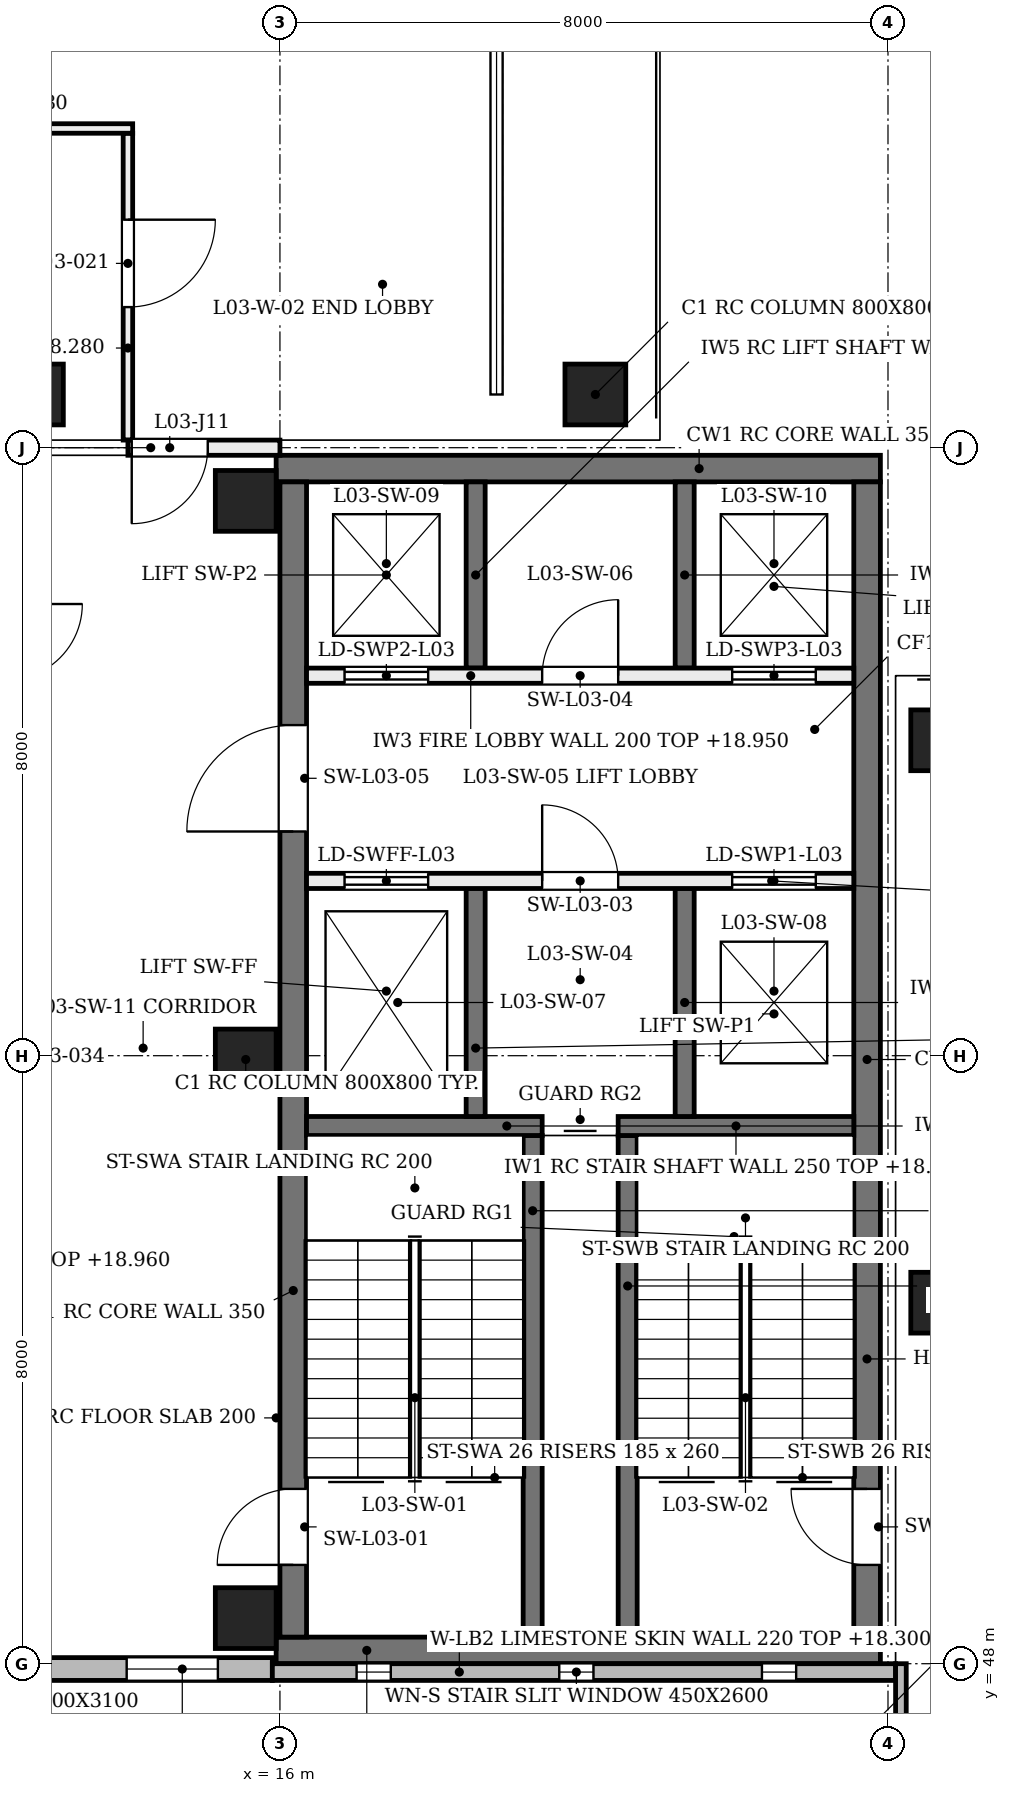
"""IFC4 building model, lengths in metres.
Left out: names, types, materials, properties, quantities, classifications, styles, units other than length and angle.
Written with IfcOpenShell. Run it as: python <this file> out.ifc"""

import sys

from ifc_helpers import new_model, si_unit, direction, frame, frame_2d, origin, origin_2d, place, context, subcontext, project, spatial, rectangle, extrude, element, fill, save


model = new_model("IFC4")
c1 = context("Model", 3, precision=1e-05, world=origin(), true_north=direction((0.0, 1.0)))
c2 = subcontext(c1, "Body", "Model", "MODEL_VIEW")
j1 = project(units=[si_unit("LENGTHUNIT", "METRE"), si_unit("PLANEANGLEUNIT", "RADIAN")], contexts=[c1])
p1 = place(None, origin())
s1 = spatial("IfcSite", under=j1, at=p1, CompositionType="ELEMENT")
p2 = place(p1, origin())
s2 = spatial("IfcBuilding", under=s1, at=p2, CompositionType="ELEMENT")
p3 = place(p2, frame((0.0, 0.0, 14.4)))
s3 = spatial("IfcBuildingStorey", under=s2, at=p3, CompositionType="ELEMENT", Elevation=14.4)
for number, where, z_axis, x_axis in (
    (1, (15.95, 48.175, 0.0), (0.0, 0.0, 1.0), (1.0, 0.0, 0.0)),
    (2, (15.95, 63.725, 0.0), (0.0, 0.0, 1.0), (1.0, 0.0, 0.0)),
):
    element("IfcWall", number, at=place(p3, frame(where, z_axis=z_axis, x_axis=x_axis)), inside=s3, PredefinedType="SHEAR", context=c2, shape_type="SweptSolid", body=[
        extrude(rectangle(XDim=7.95, YDim=0.35, at=frame_2d((3.975, 0.0))), origin(), (0.0, 0.0, 1.0), 4.58),
    ])
p4 = place(p3, frame((16.175, 48.35, 0.0), z_axis=(0.0, 0.0, 1.0), x_axis=(0.0, 1.0, 0.0)))
e3 = element("IfcWall", 3, at=p4, inside=s3, PredefinedType="SHEAR", context=c2, shape_type="SweptSolid", body=[
    extrude(rectangle(XDim=15.2, YDim=0.35, at=frame_2d((7.6, 0.0))), origin(), (0.0, 0.0, 1.0), 4.58),
])
p5 = place(p4, frame((0.95, 0.0, 0.0)))
e4 = element("IfcOpeningElement", 4, at=p5, cuts=e3, PredefinedType="OPENING", context=c2, shape_type="SweptSolid", body=[
    extrude(rectangle(XDim=1.0, YDim=2.1, at=frame_2d((0.5, 1.05))), frame((0.0, 0.185, 0.0), z_axis=(0.0, -1.0, 0.0), x_axis=(1.0, 0.0, 0.0)), (0.0, 0.0, 1.0), 0.37),
])
p6 = place(p4, frame((10.6, 0.0, 0.0)))
e5 = element("IfcOpeningElement", 5, at=p6, cuts=e3, PredefinedType="OPENING", context=c2, shape_type="SweptSolid", body=[
    extrude(rectangle(XDim=1.4, YDim=2.1, at=frame_2d((0.7, 1.05))), frame((0.0, 0.185, 0.0), z_axis=(0.0, -1.0, 0.0), x_axis=(1.0, 0.0, 0.0)), (0.0, 0.0, 1.0), 0.37),
])
p7 = place(p3, frame((23.725, 48.35, 0.0), z_axis=(0.0, 0.0, 1.0), x_axis=(0.0, 1.0, 0.0)))
e6 = element("IfcWall", 6, at=p7, inside=s3, PredefinedType="SHEAR", context=c2, shape_type="SweptSolid", body=[
    extrude(rectangle(XDim=15.2, YDim=0.35, at=frame_2d((7.6, 0.0))), origin(), (0.0, 0.0, 1.0), 4.58),
])
p8 = place(p7, frame((0.95, 0.0, 0.0)))
e7 = element("IfcOpeningElement", 7, at=p8, cuts=e6, PredefinedType="OPENING", context=c2, shape_type="SweptSolid", body=[
    extrude(rectangle(XDim=1.0, YDim=2.1, at=frame_2d((0.5, 1.05))), frame((0.0, 0.185, 0.0), z_axis=(0.0, -1.0, 0.0), x_axis=(1.0, 0.0, 0.0)), (0.0, 0.0, 1.0), 0.37),
])
for number, where, z_axis, x_axis in (
    (8, (15.55, 48.6, 0.0), (0.0, 0.0, 1.0), (1.0, 0.0, 0.0)),
    (9, (15.55, 55.95, 0.0), (0.0, 0.0, 1.0), (1.0, 0.0, 0.0)),
    (10, (15.55, 63.3, 0.0), (0.0, 0.0, 1.0), (1.0, 0.0, 0.0)),
):
    element("IfcColumn", number, at=place(p3, frame(where, z_axis=z_axis, x_axis=x_axis)), inside=s3, PredefinedType="COLUMN", context=c2, shape_type="SweptSolid", body=[
        extrude(rectangle(XDim=0.8, YDim=0.8, at=origin_2d()), origin(), (0.0, 0.0, 1.0), 4.8),
    ])
for number, where, z_axis, x_axis in (
    (11, (24.7, 53.0, 0.0), (0.0, -0.204, 0.979), (1.0, 0.0, 0.0)),
    (12, (24.7, 60.4, 0.0), (0.0, -0.204, 0.979), (1.0, 0.0, 0.0)),
    (13, (13.0, 64.7, 0.0), (-0.204, 0.0, 0.979), (0.0, -1.0, 0.0)),
    (14, (20.4, 64.7, 0.0), (-0.204, 0.0, 0.979), (0.0, -1.0, 0.0)),
):
    element("IfcColumn", number, at=place(p3, frame(where, z_axis=z_axis, x_axis=x_axis)), inside=s3, PredefinedType="COLUMN", context=c2, shape_type="SweptSolid", body=[
        extrude(rectangle(XDim=0.8, YDim=0.8, at=origin_2d()), origin(), (0.0, 0.0, 1.0), 4.903),
    ])
p9 = place(p3, frame((18.85, 64.9, 4.1), z_axis=(0.0, 0.0, 1.0), x_axis=(0.0, 1.0, 0.0)))
e15 = element("IfcWall", 15, at=p9, inside=s3, PredefinedType="SOLIDWALL", context=c2, shape_type="SweptSolid", body=[
    extrude(rectangle(XDim=6.9, YDim=0.15, at=frame_2d((3.45, 0.0))), origin(), (0.0, 0.0, 1.0), 0.48),
])
p10 = place(p3, frame((8.0, 47.93, 0.0), z_axis=(0.0, 0.0, 1.0), x_axis=(1.0, 0.0, 0.0)))
e16 = element("IfcWall", 16, at=p10, inside=s3, PredefinedType="SOLIDWALL", context=c2, shape_type="SweptSolid", body=[
    extrude(rectangle(XDim=7.9, YDim=0.3, at=frame_2d((3.95, 0.0))), origin(), (0.0, 0.0, 1.0), 3.9),
])
p11 = place(p10, frame((0.717, 0.0, 0.75)))
e17 = element("IfcOpeningElement", 17, at=p11, cuts=e16, PredefinedType="OPENING", context=c2, shape_type="SweptSolid", body=[
    extrude(rectangle(XDim=1.2, YDim=3.1, at=frame_2d((0.6, 1.55))), frame((0.0, 0.16, 0.0), z_axis=(0.0, -1.0, 0.0), x_axis=(1.0, 0.0, 0.0)), (0.0, 0.0, 1.0), 0.32),
])
p12 = place(p10, frame((3.35, 0.0, 0.75)))
e18 = element("IfcOpeningElement", 18, at=p12, cuts=e16, PredefinedType="OPENING", context=c2, shape_type="SweptSolid", body=[
    extrude(rectangle(XDim=1.2, YDim=3.1, at=frame_2d((0.6, 1.55))), frame((0.0, 0.16, 0.0), z_axis=(0.0, -1.0, 0.0), x_axis=(1.0, 0.0, 0.0)), (0.0, 0.0, 1.0), 0.32),
])
p13 = place(p10, frame((5.983, 0.0, 0.75)))
e19 = element("IfcOpeningElement", 19, at=p13, cuts=e16, PredefinedType="OPENING", context=c2, shape_type="SweptSolid", body=[
    extrude(rectangle(XDim=1.2, YDim=3.1, at=frame_2d((0.6, 1.55))), frame((0.0, 0.16, 0.0), z_axis=(0.0, -1.0, 0.0), x_axis=(1.0, 0.0, 0.0)), (0.0, 0.0, 1.0), 0.32),
])
p14 = place(p3, frame((15.9, 47.89, 0.0), z_axis=(0.0, 0.0, 1.0), x_axis=(1.0, 0.0, 0.0)))
e20 = element("IfcWall", 20, at=p14, inside=s3, PredefinedType="SOLIDWALL", context=c2, shape_type="SweptSolid", body=[
    extrude(rectangle(XDim=8.2, YDim=0.22, at=frame_2d((4.1, 0.0))), origin(), (0.0, 0.0, 1.0), 3.9),
])
p15 = place(p14, frame((1.108, 0.0, 0.9)))
e21 = element("IfcOpeningElement", 21, at=p15, cuts=e20, PredefinedType="OPENING", context=c2, shape_type="SweptSolid", body=[
    extrude(rectangle(XDim=0.45, YDim=2.6, at=frame_2d((0.225, 1.3))), frame((0.0, 0.12, 0.0), z_axis=(0.0, -1.0, 0.0), x_axis=(1.0, 0.0, 0.0)), (0.0, 0.0, 1.0), 0.24),
])
p16 = place(p14, frame((3.775, 0.0, 0.9)))
e22 = element("IfcOpeningElement", 22, at=p16, cuts=e20, PredefinedType="OPENING", context=c2, shape_type="SweptSolid", body=[
    extrude(rectangle(XDim=0.45, YDim=2.6, at=frame_2d((0.225, 1.3))), frame((0.0, 0.12, 0.0), z_axis=(0.0, -1.0, 0.0), x_axis=(1.0, 0.0, 0.0)), (0.0, 0.0, 1.0), 0.24),
])
p17 = place(p14, frame((6.442, 0.0, 0.9)))
e23 = element("IfcOpeningElement", 23, at=p17, cuts=e20, PredefinedType="OPENING", context=c2, shape_type="SweptSolid", body=[
    extrude(rectangle(XDim=0.45, YDim=2.6, at=frame_2d((0.225, 1.3))), frame((0.0, 0.12, 0.0), z_axis=(0.0, -1.0, 0.0), x_axis=(1.0, 0.0, 0.0)), (0.0, 0.0, 1.0), 0.24),
])
p18 = place(p3, frame((24.17, 45.0, 0.0), z_axis=(0.0, 0.0, 1.0), x_axis=(0.0, 1.0, 0.0)))
e24 = element("IfcWall", 24, at=p18, inside=s3, PredefinedType="SOLIDWALL", context=c2, shape_type="SweptSolid", body=[
    extrude(rectangle(XDim=3.0, YDim=0.14, at=frame_2d((1.5, 0.0))), origin(), (0.0, 0.0, 1.0), 3.9),
])
for number, where, z_axis, x_axis in (
    (25, (19.325, 48.35, 0.0), (0.0, 0.0, 1.0), (0.0, 1.0, 0.0)),
    (26, (20.575, 48.35, 0.0), (0.0, 0.0, 1.0), (0.0, 1.0, 0.0)),
):
    element("IfcWall", number, at=place(p3, frame(where, z_axis=z_axis, x_axis=x_axis)), inside=s3, PredefinedType="SOLIDWALL", context=c2, shape_type="SweptSolid", body=[
        extrude(rectangle(XDim=6.6, YDim=0.25, at=frame_2d((3.3, 0.0))), origin(), (0.0, 0.0, 1.0), 4.55),
    ])
p19 = place(p3, frame((16.35, 55.075, 0.0), z_axis=(0.0, 0.0, 1.0), x_axis=(1.0, 0.0, 0.0)))
e27 = element("IfcWall", 27, at=p19, inside=s3, PredefinedType="SOLIDWALL", context=c2, shape_type="SweptSolid", body=[
    extrude(rectangle(XDim=3.1, YDim=0.25, at=frame_2d((1.55, 0.0))), origin(), (0.0, 0.0, 1.0), 4.55),
])
p20 = place(p3, frame((20.45, 55.075, 0.0), z_axis=(0.0, 0.0, 1.0), x_axis=(1.0, 0.0, 0.0)))
e28 = element("IfcWall", 28, at=p20, inside=s3, PredefinedType="SOLIDWALL", context=c2, shape_type="SweptSolid", body=[
    extrude(rectangle(XDim=3.1, YDim=0.25, at=frame_2d((1.55, 0.0))), origin(), (0.0, 0.0, 1.0), 4.55),
])
p21 = place(p3, frame((18.575, 55.2, 0.0), z_axis=(0.0, 0.0, 1.0), x_axis=(0.0, 1.0, 0.0)))
e29 = element("IfcWall", 29, at=p21, inside=s3, PredefinedType="SOLIDWALL", context=c2, shape_type="SweptSolid", body=[
    extrude(rectangle(XDim=3.0, YDim=0.25, at=frame_2d((1.5, 0.0))), origin(), (0.0, 0.0, 1.0), 4.55),
])
p22 = place(p3, frame((18.575, 61.1, 0.0), z_axis=(0.0, 0.0, 1.0), x_axis=(0.0, 1.0, 0.0)))
e30 = element("IfcWall", 30, at=p22, inside=s3, PredefinedType="SOLIDWALL", context=c2, shape_type="SweptSolid", body=[
    extrude(rectangle(XDim=2.45, YDim=0.25, at=frame_2d((1.225, 0.0))), origin(), (0.0, 0.0, 1.0), 4.55),
])
p23 = place(p3, frame((21.325, 55.2, 0.0), z_axis=(0.0, 0.0, 1.0), x_axis=(0.0, 1.0, 0.0)))
e31 = element("IfcWall", 31, at=p23, inside=s3, PredefinedType="SOLIDWALL", context=c2, shape_type="SweptSolid", body=[
    extrude(rectangle(XDim=3.0, YDim=0.25, at=frame_2d((1.5, 0.0))), origin(), (0.0, 0.0, 1.0), 4.55),
])
p24 = place(p3, frame((21.325, 61.1, 0.0), z_axis=(0.0, 0.0, 1.0), x_axis=(0.0, 1.0, 0.0)))
e32 = element("IfcWall", 32, at=p24, inside=s3, PredefinedType="SOLIDWALL", context=c2, shape_type="SweptSolid", body=[
    extrude(rectangle(XDim=2.45, YDim=0.25, at=frame_2d((1.225, 0.0))), origin(), (0.0, 0.0, 1.0), 4.55),
])
p25 = place(p3, frame((16.35, 58.3, 0.0), z_axis=(0.0, 0.0, 1.0), x_axis=(1.0, 0.0, 0.0)))
e33 = element("IfcWall", 33, at=p25, inside=s3, PredefinedType="SOLIDWALL", context=c2, shape_type="SweptSolid", body=[
    extrude(rectangle(XDim=7.2, YDim=0.2, at=frame_2d((3.6, 0.0))), origin(), (0.0, 0.0, 1.0), 4.55),
])
p26 = place(p25, frame((0.5, 0.0, 0.0)))
e34 = element("IfcOpeningElement", 34, at=p26, cuts=e33, PredefinedType="OPENING", context=c2, shape_type="SweptSolid", body=[
    extrude(rectangle(XDim=1.1, YDim=2.1, at=frame_2d((0.55, 1.05))), frame((0.0, 0.11, 0.0), z_axis=(0.0, -1.0, 0.0), x_axis=(1.0, 0.0, 0.0)), (0.0, 0.0, 1.0), 0.22),
])
p27 = place(p25, frame((5.6, 0.0, 0.0)))
e35 = element("IfcOpeningElement", 35, at=p27, cuts=e33, PredefinedType="OPENING", context=c2, shape_type="SweptSolid", body=[
    extrude(rectangle(XDim=1.1, YDim=2.1, at=frame_2d((0.55, 1.05))), frame((0.0, 0.11, 0.0), z_axis=(0.0, -1.0, 0.0), x_axis=(1.0, 0.0, 0.0)), (0.0, 0.0, 1.0), 0.22),
])
p28 = place(p25, frame((3.1, 0.0, 0.0)))
e36 = element("IfcOpeningElement", 36, at=p28, cuts=e33, PredefinedType="OPENING", context=c2, shape_type="SweptSolid", body=[
    extrude(rectangle(XDim=1.0, YDim=2.1, at=frame_2d((0.5, 1.05))), frame((0.0, 0.11, 0.0), z_axis=(0.0, -1.0, 0.0), x_axis=(1.0, 0.0, 0.0)), (0.0, 0.0, 1.0), 0.22),
])
p29 = place(p3, frame((16.35, 61.0, 0.0), z_axis=(0.0, 0.0, 1.0), x_axis=(1.0, 0.0, 0.0)))
e37 = element("IfcWall", 37, at=p29, inside=s3, PredefinedType="SOLIDWALL", context=c2, shape_type="SweptSolid", body=[
    extrude(rectangle(XDim=7.2, YDim=0.2, at=frame_2d((3.6, 0.0))), origin(), (0.0, 0.0, 1.0), 4.55),
])
p30 = place(p29, frame((0.5, 0.0, 0.0)))
e38 = element("IfcOpeningElement", 38, at=p30, cuts=e37, PredefinedType="OPENING", context=c2, shape_type="SweptSolid", body=[
    extrude(rectangle(XDim=1.1, YDim=2.1, at=frame_2d((0.55, 1.05))), frame((0.0, 0.11, 0.0), z_axis=(0.0, -1.0, 0.0), x_axis=(1.0, 0.0, 0.0)), (0.0, 0.0, 1.0), 0.22),
])
p31 = place(p29, frame((5.6, 0.0, 0.0)))
e39 = element("IfcOpeningElement", 39, at=p31, cuts=e37, PredefinedType="OPENING", context=c2, shape_type="SweptSolid", body=[
    extrude(rectangle(XDim=1.1, YDim=2.1, at=frame_2d((0.55, 1.05))), frame((0.0, 0.11, 0.0), z_axis=(0.0, -1.0, 0.0), x_axis=(1.0, 0.0, 0.0)), (0.0, 0.0, 1.0), 0.22),
])
p32 = place(p29, frame((3.1, 0.0, 0.0)))
e40 = element("IfcOpeningElement", 40, at=p32, cuts=e37, PredefinedType="OPENING", context=c2, shape_type="SweptSolid", body=[
    extrude(rectangle(XDim=1.0, YDim=2.1, at=frame_2d((0.5, 1.05))), frame((0.0, 0.11, 0.0), z_axis=(0.0, -1.0, 0.0), x_axis=(1.0, 0.0, 0.0)), (0.0, 0.0, 1.0), 0.22),
])
p33 = place(p3, frame((14.0, 64.1, 0.0), z_axis=(0.0, 0.0, 1.0), x_axis=(0.0, 1.0, 0.0)))
e41 = element("IfcWall", 41, at=p33, inside=s3, PredefinedType="PARTITIONING", context=c2, shape_type="SweptSolid", body=[
    extrude(rectangle(XDim=4.037, YDim=0.125, at=frame_2d((2.019, 0.0))), origin(), (0.0, 0.0, 1.0), 3.88),
])
p34 = place(p33, frame((1.75, 0.0, 0.0)))
e42 = element("IfcOpeningElement", 42, at=p34, cuts=e41, PredefinedType="OPENING", context=c2, shape_type="SweptSolid", body=[
    extrude(rectangle(XDim=1.15, YDim=2.1, at=frame_2d((0.575, 1.05))), frame((0.0, 0.073, 0.0), z_axis=(0.0, -1.0, 0.0), x_axis=(1.0, 0.0, 0.0)), (0.0, 0.0, 1.0), 0.145),
])
p35 = place(p3, frame((6.23, 68.2, 0.0), z_axis=(0.0, 0.0, 1.0), x_axis=(1.0, 0.0, 0.0)))
e43 = element("IfcWall", 43, at=p35, inside=s3, PredefinedType="PARTITIONING", context=c2, shape_type="SweptSolid", body=[
    extrude(rectangle(XDim=7.833, YDim=0.125, at=frame_2d((3.916, 0.0))), origin(), (0.0, 0.0, 1.0), 4.08),
])
p36 = place(p3, frame((14.0, 64.0, 0.0), z_axis=(0.0, 0.0, 1.0), x_axis=(1.0, 0.0, 0.0)))
e44 = element("IfcWall", 44, at=p36, inside=s3, PredefinedType="PARTITIONING", context=c2, shape_type="SweptSolid", body=[
    extrude(rectangle(XDim=2.0, YDim=0.2, at=frame_2d((1.0, 0.0))), origin(), (0.0, 0.0, 1.0), 3.88),
])
p37 = place(p36, frame((0.05, 0.0, 0.0)))
e45 = element("IfcOpeningElement", 45, at=p37, cuts=e44, PredefinedType="OPENING", context=c2, shape_type="SweptSolid", body=[
    extrude(rectangle(XDim=1.0, YDim=2.1, at=frame_2d((0.5, 1.05))), frame((0.0, 0.11, 0.0), z_axis=(0.0, -1.0, 0.0), x_axis=(1.0, 0.0, 0.0)), (0.0, 0.0, 1.0), 0.22),
])
p38 = place(p13, origin())
e46 = element("IfcWindow", 46, at=p38, inside=s3, PartitioningType="SINGLE_PANEL", PredefinedType="WINDOW", context=c2, shape_type="SweptSolid", body=[
    extrude(rectangle(XDim=1.2, YDim=3.1, at=frame_2d((0.6, 1.55))), frame((0.0, 0.03, 0.0), z_axis=(0.0, -1.0, 0.0), x_axis=(1.0, 0.0, 0.0)), (0.0, 0.0, 1.0), 0.06),
])
fill(e19, e46)
p39 = place(p15, origin())
e47 = element("IfcWindow", 47, at=p39, inside=s3, PartitioningType="SINGLE_PANEL", PredefinedType="WINDOW", context=c2, shape_type="SweptSolid", body=[
    extrude(rectangle(XDim=0.45, YDim=2.6, at=frame_2d((0.225, 1.3))), frame((0.0, 0.03, 0.0), z_axis=(0.0, -1.0, 0.0), x_axis=(1.0, 0.0, 0.0)), (0.0, 0.0, 1.0), 0.06),
])
fill(e21, e47)
p40 = place(p16, origin())
e48 = element("IfcWindow", 48, at=p40, inside=s3, PartitioningType="SINGLE_PANEL", PredefinedType="WINDOW", context=c2, shape_type="SweptSolid", body=[
    extrude(rectangle(XDim=0.45, YDim=2.6, at=frame_2d((0.225, 1.3))), frame((0.0, 0.03, 0.0), z_axis=(0.0, -1.0, 0.0), x_axis=(1.0, 0.0, 0.0)), (0.0, 0.0, 1.0), 0.06),
])
fill(e22, e48)
p41 = place(p17, origin())
e49 = element("IfcWindow", 49, at=p41, inside=s3, PartitioningType="SINGLE_PANEL", PredefinedType="WINDOW", context=c2, shape_type="SweptSolid", body=[
    extrude(rectangle(XDim=0.45, YDim=2.6, at=frame_2d((0.225, 1.3))), frame((0.0, 0.03, 0.0), z_axis=(0.0, -1.0, 0.0), x_axis=(1.0, 0.0, 0.0)), (0.0, 0.0, 1.0), 0.06),
])
fill(e23, e49)
p42 = place(p5, origin())
e50 = element("IfcDoor", 50, at=p42, inside=s3, OperationType="SINGLE_SWING_LEFT", PredefinedType="DOOR", context=c2, shape_type="SweptSolid", body=[
    extrude(rectangle(XDim=1.0, YDim=2.1, at=frame_2d((0.5, 1.05))), frame((0.0, 0.025, 0.0), z_axis=(0.0, -1.0, 0.0), x_axis=(1.0, 0.0, 0.0)), (0.0, 0.0, 1.0), 0.05),
])
fill(e4, e50)
p43 = place(p8, frame((1.0, 0.0, 0.0), z_axis=(0.0, 0.0, 1.0), x_axis=(-1.0, 0.0, 0.0)))
e51 = element("IfcDoor", 51, at=p43, inside=s3, OperationType="SINGLE_SWING_RIGHT", PredefinedType="DOOR", context=c2, shape_type="SweptSolid", body=[
    extrude(rectangle(XDim=1.0, YDim=2.1, at=frame_2d((0.5, 1.05))), frame((0.0, 0.025, 0.0), z_axis=(0.0, -1.0, 0.0), x_axis=(1.0, 0.0, 0.0)), (0.0, 0.0, 1.0), 0.05),
])
fill(e7, e51)
p44 = place(p26, origin())
e52 = element("IfcDoor", 52, at=p44, inside=s3, OperationType="DOUBLE_DOOR_SLIDING", PredefinedType="DOOR", context=c2, shape_type="SweptSolid", body=[
    extrude(rectangle(XDim=1.1, YDim=2.1, at=frame_2d((0.55, 1.05))), frame((0.0, 0.025, 0.0), z_axis=(0.0, -1.0, 0.0), x_axis=(1.0, 0.0, 0.0)), (0.0, 0.0, 1.0), 0.05),
])
fill(e34, e52)
p45 = place(p27, origin())
e53 = element("IfcDoor", 53, at=p45, inside=s3, OperationType="DOUBLE_DOOR_SLIDING", PredefinedType="DOOR", context=c2, shape_type="SweptSolid", body=[
    extrude(rectangle(XDim=1.1, YDim=2.1, at=frame_2d((0.55, 1.05))), frame((0.0, 0.025, 0.0), z_axis=(0.0, -1.0, 0.0), x_axis=(1.0, 0.0, 0.0)), (0.0, 0.0, 1.0), 0.05),
])
fill(e35, e53)
p46 = place(p30, frame((1.1, 0.0, 0.0), z_axis=(0.0, 0.0, 1.0), x_axis=(-1.0, 0.0, 0.0)))
e54 = element("IfcDoor", 54, at=p46, inside=s3, OperationType="DOUBLE_DOOR_SLIDING", PredefinedType="DOOR", context=c2, shape_type="SweptSolid", body=[
    extrude(rectangle(XDim=1.1, YDim=2.1, at=frame_2d((0.55, 1.05))), frame((0.0, 0.025, 0.0), z_axis=(0.0, -1.0, 0.0), x_axis=(1.0, 0.0, 0.0)), (0.0, 0.0, 1.0), 0.05),
])
fill(e38, e54)
p47 = place(p31, frame((1.1, 0.0, 0.0), z_axis=(0.0, 0.0, 1.0), x_axis=(-1.0, 0.0, 0.0)))
e55 = element("IfcDoor", 55, at=p47, inside=s3, OperationType="DOUBLE_DOOR_SLIDING", PredefinedType="DOOR", context=c2, shape_type="SweptSolid", body=[
    extrude(rectangle(XDim=1.1, YDim=2.1, at=frame_2d((0.55, 1.05))), frame((0.0, 0.025, 0.0), z_axis=(0.0, -1.0, 0.0), x_axis=(1.0, 0.0, 0.0)), (0.0, 0.0, 1.0), 0.05),
])
fill(e39, e55)
p48 = place(p28, origin())
e56 = element("IfcDoor", 56, at=p48, inside=s3, OperationType="SINGLE_SWING_LEFT", PredefinedType="DOOR", context=c2, shape_type="SweptSolid", body=[
    extrude(rectangle(XDim=1.0, YDim=2.1, at=frame_2d((0.5, 1.05))), frame((0.0, 0.025, 0.0), z_axis=(0.0, -1.0, 0.0), x_axis=(1.0, 0.0, 0.0)), (0.0, 0.0, 1.0), 0.05),
])
fill(e36, e56)
p49 = place(p32, frame((1.0, 0.0, 0.0), z_axis=(0.0, 0.0, 1.0), x_axis=(-1.0, 0.0, 0.0)))
e57 = element("IfcDoor", 57, at=p49, inside=s3, OperationType="SINGLE_SWING_RIGHT", PredefinedType="DOOR", context=c2, shape_type="SweptSolid", body=[
    extrude(rectangle(XDim=1.0, YDim=2.1, at=frame_2d((0.5, 1.05))), frame((0.0, 0.025, 0.0), z_axis=(0.0, -1.0, 0.0), x_axis=(1.0, 0.0, 0.0)), (0.0, 0.0, 1.0), 0.05),
])
fill(e40, e57)
p50 = place(p6, origin())
e58 = element("IfcDoor", 58, at=p50, inside=s3, OperationType="SINGLE_SWING_LEFT", PredefinedType="DOOR", context=c2, shape_type="SweptSolid", body=[
    extrude(rectangle(XDim=1.4, YDim=2.1, at=frame_2d((0.7, 1.05))), frame((0.0, 0.025, 0.0), z_axis=(0.0, -1.0, 0.0), x_axis=(1.0, 0.0, 0.0)), (0.0, 0.0, 1.0), 0.05),
])
fill(e5, e58)
p51 = place(p34, origin())
e59 = element("IfcDoor", 59, at=p51, inside=s3, OperationType="SINGLE_SWING_RIGHT", PredefinedType="DOOR", context=c2, shape_type="SweptSolid", body=[
    extrude(rectangle(XDim=1.15, YDim=2.1, at=frame_2d((0.575, 1.05))), frame((0.0, 0.025, 0.0), z_axis=(0.0, -1.0, 0.0), x_axis=(1.0, 0.0, 0.0)), (0.0, 0.0, 1.0), 0.05),
])
fill(e42, e59)
p52 = place(p37, frame((1.0, 0.0, 0.0), z_axis=(0.0, 0.0, 1.0), x_axis=(-1.0, 0.0, 0.0)))
e60 = element("IfcDoor", 60, at=p52, inside=s3, OperationType="SINGLE_SWING_LEFT", PredefinedType="DOOR", context=c2, shape_type="SweptSolid", body=[
    extrude(rectangle(XDim=1.0, YDim=2.1, at=frame_2d((0.5, 1.05))), frame((0.0, 0.025, 0.0), z_axis=(0.0, -1.0, 0.0), x_axis=(1.0, 0.0, 0.0)), (0.0, 0.0, 1.0), 0.05),
])
fill(e45, e60)
save(model, sys.argv[1])
